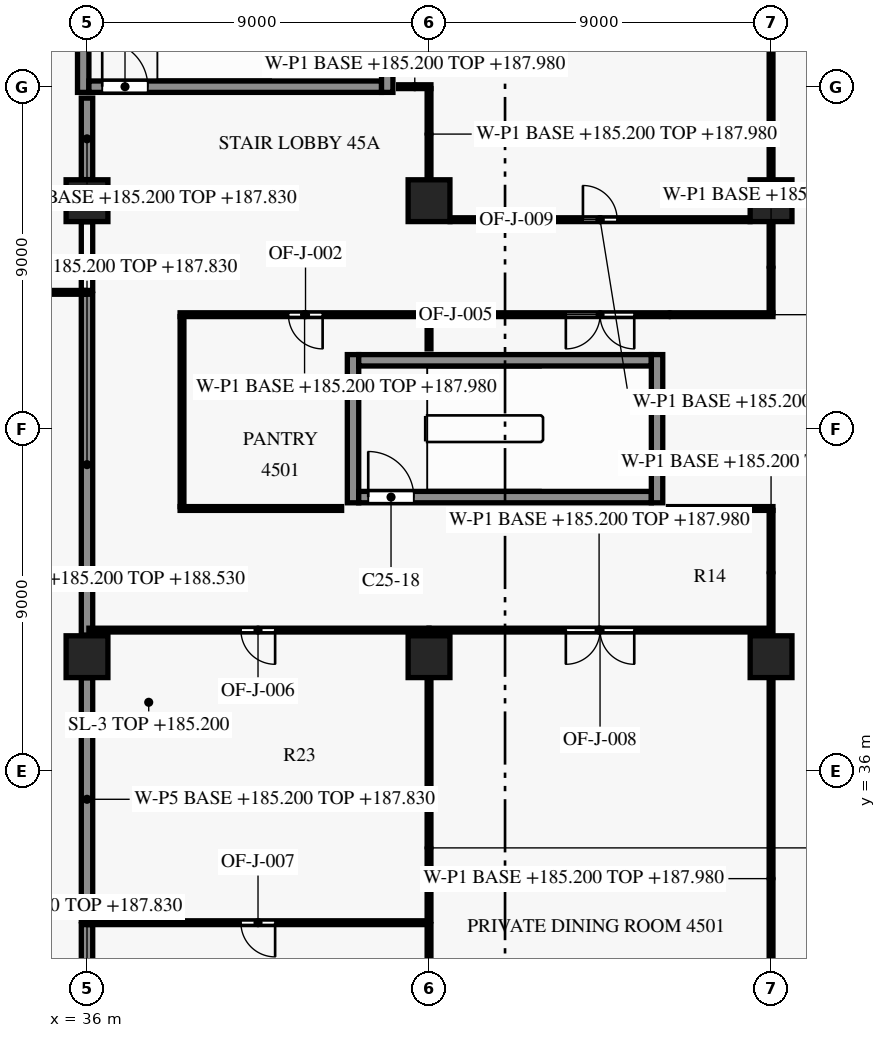
"""IFC4 building model, lengths in metres.
Left out: names, types, materials, properties, quantities, classifications, styles, units other than length and angle.
Written with IfcOpenShell. Run it as: python <this file> out.ifc"""

import sys

from ifc_helpers import new_model, si_unit, direction, frame, frame_2d, origin, origin_2d, place, context, subcontext, project, spatial, rectangle, extrude, element, fill, save


model = new_model("IFC4")
c1 = context("Model", 3, precision=1e-05, world=origin(), true_north=direction((0.0, 1.0)))
c2 = subcontext(c1, "Body", "Model", "MODEL_VIEW")
j1 = project(units=[si_unit("LENGTHUNIT", "METRE"), si_unit("PLANEANGLEUNIT", "RADIAN")], contexts=[c1])
p1 = place(None, origin())
s1 = spatial("IfcSite", under=j1, at=p1, CompositionType="ELEMENT")
p2 = place(p1, origin())
s2 = spatial("IfcBuilding", under=s1, at=p2, CompositionType="ELEMENT")
p3 = place(p2, frame((0.0, 0.0, 185.2)))
s3 = spatial("IfcBuildingStorey", under=s2, at=p3, CompositionType="ELEMENT", Elevation=185.2)
for number, where, z_axis, x_axis in (
    (1, (36.0, 39.0, 0.0), (0.0, 0.0, 1.0), (1.0, 0.0, 0.0)),
    (2, (36.0, 51.0, 0.0), (0.0, 0.0, 1.0), (1.0, 0.0, 0.0)),
    (3, (45.0, 39.0, 0.0), (0.0, 0.0, 1.0), (1.0, 0.0, 0.0)),
    (4, (45.0, 51.0, 0.0), (0.0, 0.0, 1.0), (1.0, 0.0, 0.0)),
    (5, (54.0, 39.0, 0.0), (0.0, 0.0, 1.0), (1.0, 0.0, 0.0)),
    (6, (54.0, 51.0, 0.0), (0.0, 0.0, 1.0), (1.0, 0.0, 0.0)),
):
    element("IfcColumn", number, at=place(p3, frame(where, z_axis=z_axis, x_axis=x_axis)), inside=s3, PredefinedType="COLUMN", context=c2, shape_type="SweptSolid", body=[
        extrude(rectangle(XDim=1.1, YDim=1.1, at=origin_2d()), origin(), (0.0, 0.0, 1.0), 3.8),
    ])
p4 = place(p3, frame((43.15, 43.2, 0.0), z_axis=(0.0, 0.0, 1.0), x_axis=(1.0, 0.0, 0.0)))
e7 = element("IfcWall", 7, at=p4, inside=s3, PredefinedType="SHEAR", context=c2, shape_type="SweptSolid", body=[
    extrude(rectangle(XDim=7.7, YDim=0.3, at=frame_2d((3.85, 0.0))), origin(), (0.0, 0.0, 1.0), 3.5),
])
p5 = place(p4, frame((0.25, 0.0, 0.0)))
e8 = element("IfcOpeningElement", 8, at=p5, cuts=e7, PredefinedType="OPENING", context=c2, shape_type="SweptSolid", body=[
    extrude(rectangle(XDim=1.2, YDim=2.2, at=frame_2d((0.6, 1.1))), frame((0.0, 0.16, 0.0), z_axis=(0.0, -1.0, 0.0), x_axis=(1.0, 0.0, 0.0)), (0.0, 0.0, 1.0), 0.32),
])
p6 = place(p3, frame((43.15, 46.8, 0.0), z_axis=(0.0, 0.0, 1.0), x_axis=(1.0, 0.0, 0.0)))
e9 = element("IfcWall", 9, at=p6, inside=s3, PredefinedType="SHEAR", context=c2, shape_type="SweptSolid", body=[
    extrude(rectangle(XDim=7.7, YDim=0.3, at=frame_2d((3.85, 0.0))), origin(), (0.0, 0.0, 1.0), 3.5),
])
p7 = place(p3, frame((36.05, 54.0, 0.0), z_axis=(0.0, 0.0, 1.0), x_axis=(1.0, 0.0, 0.0)))
e10 = element("IfcWall", 10, at=p7, inside=s3, PredefinedType="SHEAR", context=c2, shape_type="SweptSolid", body=[
    extrude(rectangle(XDim=7.7, YDim=0.3, at=frame_2d((3.85, 0.0))), origin(), (0.0, 0.0, 1.0), 3.5),
])
p8 = place(p7, frame((0.35, 0.0, 0.0)))
e11 = element("IfcOpeningElement", 11, at=p8, cuts=e10, PredefinedType="OPENING", context=c2, shape_type="SweptSolid", body=[
    extrude(rectangle(XDim=1.2, YDim=2.2, at=frame_2d((0.6, 1.1))), frame((0.0, 0.16, 0.0), z_axis=(0.0, -1.0, 0.0), x_axis=(1.0, 0.0, 0.0)), (0.0, 0.0, 1.0), 0.32),
])
for number, where, z_axis, x_axis in (
    (12, (35.9, 53.85, 0.0), (0.0, 0.0, 1.0), (0.0, 1.0, 0.0)),
    (13, (43.0, 43.05, 0.0), (0.0, 0.0, 1.0), (0.0, 1.0, 0.0)),
    (14, (43.9, 53.85, 0.0), (0.0, 0.0, 1.0), (0.0, 1.0, 0.0)),
    (15, (51.0, 43.05, 0.0), (0.0, 0.0, 1.0), (0.0, 1.0, 0.0)),
):
    element("IfcWall", number, at=place(p3, frame(where, z_axis=z_axis, x_axis=x_axis)), inside=s3, PredefinedType="SHEAR", context=c2, shape_type="SweptSolid", body=[
        extrude(rectangle(XDim=3.9, YDim=0.3, at=frame_2d((1.95, 0.0))), origin(), (0.0, 0.0, 1.0), 3.5),
    ])
p9 = place(p3, frame((54.0, 27.874, 0.0), z_axis=(0.0, 0.0, 1.0), x_axis=(0.0, 1.0, 0.0)))
e16 = element("IfcWall", 16, at=p9, inside=s3, PredefinedType="PARTITIONING", context=c2, shape_type="SweptSolid", body=[
    extrude(rectangle(XDim=10.571, YDim=0.1, at=frame_2d((5.285, 0.0))), origin(), (0.0, 0.0, 1.0), 2.78),
])
p10 = place(p3, frame((36.0, 27.874, 0.0), z_axis=(0.0, 0.0, 1.0), x_axis=(0.0, 1.0, 0.0)))
e17 = element("IfcWall", 17, at=p10, inside=s3, PredefinedType="PARTITIONING", context=c2, shape_type="SweptSolid", body=[
    extrude(rectangle(XDim=4.076, YDim=0.3, at=frame_2d((2.038, 0.0))), origin(), (0.0, 0.0, 1.0), 2.63),
])
p11 = place(p3, frame((45.0, 31.95, 0.0), z_axis=(0.0, 0.0, 1.0), x_axis=(0.0, -1.0, 0.0)))
e18 = element("IfcWall", 18, at=p11, inside=s3, PredefinedType="PARTITIONING", context=c2, shape_type="SweptSolid", body=[
    extrude(rectangle(XDim=4.976, YDim=0.1, at=frame_2d((2.488, 0.0))), origin(), (0.0, 0.0, 1.0), 2.78),
])
p12 = place(p3, frame((44.95, 32.0, 0.0), z_axis=(0.0, 0.0, 1.0), x_axis=(-1.0, 0.0, 0.0)))
e19 = element("IfcWall", 19, at=p12, inside=s3, PredefinedType="PARTITIONING", context=c2, shape_type="SweptSolid", body=[
    extrude(rectangle(XDim=8.9, YDim=0.1, at=frame_2d((4.45, 0.0))), origin(), (0.0, 0.0, 1.0), 2.63),
])
p13 = place(p12, frame((4.0, 0.0, 0.0)))
e20 = element("IfcOpeningElement", 20, at=p13, cuts=e19, PredefinedType="OPENING", context=c2, shape_type="SweptSolid", body=[
    extrude(rectangle(XDim=0.9, YDim=2.1, at=frame_2d((0.45, 1.05))), frame((0.0, 0.06, 0.0), z_axis=(0.0, -1.0, 0.0), x_axis=(1.0, 0.0, 0.0)), (0.0, 0.0, 1.0), 0.12),
])
p14 = place(p3, frame((36.0, 32.05, 0.0), z_axis=(0.0, 0.0, 1.0), x_axis=(0.0, 1.0, 0.0)))
e21 = element("IfcWall", 21, at=p14, inside=s3, PredefinedType="PARTITIONING", context=c2, shape_type="SweptSolid", body=[
    extrude(rectangle(XDim=6.395, YDim=0.3, at=frame_2d((3.198, 0.0))), origin(), (0.0, 0.0, 1.0), 2.63),
])
p15 = place(p3, frame((45.0, 38.445, 0.0), z_axis=(0.0, 0.0, 1.0), x_axis=(0.0, -1.0, 0.0)))
e22 = element("IfcWall", 22, at=p15, inside=s3, PredefinedType="PARTITIONING", context=c2, shape_type="SweptSolid", body=[
    extrude(rectangle(XDim=6.395, YDim=0.1, at=frame_2d((3.198, 0.0))), origin(), (0.0, 0.0, 1.0), 2.78),
])
p16 = place(p3, frame((45.0, 39.7, 0.0), z_axis=(0.0, 0.0, 1.0), x_axis=(-1.0, 0.0, 0.0)))
e23 = element("IfcWall", 23, at=p16, inside=s3, PredefinedType="PARTITIONING", context=c2, shape_type="SweptSolid", body=[
    extrude(rectangle(XDim=8.95, YDim=0.1, at=frame_2d((4.475, 0.0))), origin(), (0.0, 0.0, 1.0), 2.63),
])
p17 = place(p16, frame((4.05, 0.0, 0.0)))
e24 = element("IfcOpeningElement", 24, at=p17, cuts=e23, PredefinedType="OPENING", context=c2, shape_type="SweptSolid", body=[
    extrude(rectangle(XDim=0.9, YDim=2.1, at=frame_2d((0.45, 1.05))), frame((0.0, 0.06, 0.0), z_axis=(0.0, -1.0, 0.0), x_axis=(1.0, 0.0, 0.0)), (0.0, 0.0, 1.0), 0.12),
])
p18 = place(p3, frame((53.95, 39.7, 0.0), z_axis=(0.0, 0.0, 1.0), x_axis=(-1.0, 0.0, 0.0)))
e25 = element("IfcWall", 25, at=p18, inside=s3, PredefinedType="PARTITIONING", context=c2, shape_type="SweptSolid", body=[
    extrude(rectangle(XDim=8.95, YDim=0.1, at=frame_2d((4.475, 0.0))), origin(), (0.0, 0.0, 1.0), 2.78),
])
p19 = place(p18, frame((3.55, 0.0, 0.0)))
e26 = element("IfcOpeningElement", 26, at=p19, cuts=e25, PredefinedType="OPENING", context=c2, shape_type="SweptSolid", body=[
    extrude(rectangle(XDim=1.8, YDim=2.1, at=frame_2d((0.9, 1.05))), frame((0.0, 0.06, 0.0), z_axis=(0.0, -1.0, 0.0), x_axis=(1.0, 0.0, 0.0)), (0.0, 0.0, 1.0), 0.12),
])
p20 = place(p3, frame((36.0, 39.57, 0.0), z_axis=(0.0, 0.0, 1.0), x_axis=(0.0, 1.0, 0.0)))
e27 = element("IfcWall", 27, at=p20, inside=s3, PredefinedType="PARTITIONING", context=c2, shape_type="SweptSolid", body=[
    extrude(rectangle(XDim=8.968, YDim=0.3, at=frame_2d((4.484, 0.0))), origin(), (0.0, 0.0, 1.0), 2.63),
])
p21 = place(p3, frame((54.0, 42.85, 0.0), z_axis=(0.0, 0.0, 1.0), x_axis=(0.0, -1.0, 0.0)))
e28 = element("IfcWall", 28, at=p21, inside=s3, PredefinedType="PARTITIONING", context=c2, shape_type="SweptSolid", body=[
    extrude(rectangle(XDim=3.28, YDim=0.1, at=frame_2d((1.64, 0.0))), origin(), (0.0, 0.0, 1.0), 2.78),
])
p22 = place(p3, frame((38.45, 42.9, 0.0), z_axis=(0.0, 0.0, 1.0), x_axis=(1.0, 0.0, 0.0)))
e29 = element("IfcWall", 29, at=p22, inside=s3, PredefinedType="PARTITIONING", context=c2, shape_type="SweptSolid", body=[
    extrude(rectangle(XDim=4.25, YDim=0.1, at=frame_2d((2.125, 0.0))), origin(), (0.0, 0.0, 1.0), 2.63),
])
p23 = place(p3, frame((51.3, 42.9, 0.0), z_axis=(0.0, 0.0, 1.0), x_axis=(1.0, 0.0, 0.0)))
e30 = element("IfcWall", 30, at=p23, inside=s3, PredefinedType="PARTITIONING", context=c2, shape_type="SweptSolid", body=[
    extrude(rectangle(XDim=2.75, YDim=0.1, at=frame_2d((1.375, 0.0))), origin(), (0.0, 0.0, 1.0), 2.63),
])
p24 = place(p3, frame((38.5, 47.95, 0.0), z_axis=(0.0, 0.0, 1.0), x_axis=(0.0, -1.0, 0.0)))
e31 = element("IfcWall", 31, at=p24, inside=s3, PredefinedType="PARTITIONING", context=c2, shape_type="SweptSolid", body=[
    extrude(rectangle(XDim=5.0, YDim=0.1, at=frame_2d((2.5, 0.0))), origin(), (0.0, 0.0, 1.0), 2.63),
])
p25 = place(p3, frame((45.0, 47.95, 0.0), z_axis=(0.0, 0.0, 1.0), x_axis=(0.0, -1.0, 0.0)))
e32 = element("IfcWall", 32, at=p25, inside=s3, PredefinedType="PARTITIONING", context=c2, shape_type="SweptSolid", body=[
    extrude(rectangle(XDim=0.85, YDim=0.1, at=frame_2d((0.425, 0.0))), origin(), (0.0, 0.0, 1.0), 2.63),
])
p26 = place(p3, frame((45.0, 48.0, 0.0), z_axis=(0.0, 0.0, 1.0), x_axis=(-1.0, 0.0, 0.0)))
e33 = element("IfcWall", 33, at=p26, inside=s3, PredefinedType="PARTITIONING", context=c2, shape_type="SweptSolid", body=[
    extrude(rectangle(XDim=6.55, YDim=0.1, at=frame_2d((3.275, 0.0))), origin(), (0.0, 0.0, 1.0), 2.78),
])
p27 = place(p26, frame((2.8, 0.0, 0.0)))
e34 = element("IfcOpeningElement", 34, at=p27, cuts=e33, PredefinedType="OPENING", context=c2, shape_type="SweptSolid", body=[
    extrude(rectangle(XDim=0.9, YDim=2.1, at=frame_2d((0.45, 1.05))), frame((0.0, 0.06, 0.0), z_axis=(0.0, -1.0, 0.0), x_axis=(1.0, 0.0, 0.0)), (0.0, 0.0, 1.0), 0.12),
])
p28 = place(p3, frame((54.05, 48.0, 0.0), z_axis=(0.0, 0.0, 1.0), x_axis=(-1.0, 0.0, 0.0)))
e35 = element("IfcWall", 35, at=p28, inside=s3, PredefinedType="PARTITIONING", context=c2, shape_type="SweptSolid", body=[
    extrude(rectangle(XDim=9.05, YDim=0.1, at=frame_2d((4.525, 0.0))), origin(), (0.0, 0.0, 1.0), 2.78),
])
p29 = place(p28, frame((3.65, 0.0, 0.0)))
e36 = element("IfcOpeningElement", 36, at=p29, cuts=e35, PredefinedType="OPENING", context=c2, shape_type="SweptSolid", body=[
    extrude(rectangle(XDim=1.8, YDim=2.1, at=frame_2d((0.9, 1.05))), frame((0.0, 0.06, 0.0), z_axis=(0.0, -1.0, 0.0), x_axis=(1.0, 0.0, 0.0)), (0.0, 0.0, 1.0), 0.12),
])
p30 = place(p3, frame((31.05, 48.588, 0.0), z_axis=(0.0, 0.0, 1.0), x_axis=(1.0, 0.0, 0.0)))
e37 = element("IfcWall", 37, at=p30, inside=s3, PredefinedType="PARTITIONING", context=c2, shape_type="SweptSolid", body=[
    extrude(rectangle(XDim=4.9, YDim=0.1, at=frame_2d((2.45, 0.0))), origin(), (0.0, 0.0, 1.0), 2.63),
])
p31 = place(p3, frame((36.0, 48.638, 0.0), z_axis=(0.0, 0.0, 1.0), x_axis=(0.0, 1.0, 0.0)))
e38 = element("IfcWall", 38, at=p31, inside=s3, PredefinedType="PARTITIONING", context=c2, shape_type="SweptSolid", body=[
    extrude(rectangle(XDim=1.807, YDim=0.3, at=frame_2d((0.904, 0.0))), origin(), (0.0, 0.0, 1.0), 2.63),
])
p32 = place(p3, frame((54.0, 50.445, 0.0), z_axis=(0.0, 0.0, 1.0), x_axis=(0.0, -1.0, 0.0)))
e39 = element("IfcWall", 39, at=p32, inside=s3, PredefinedType="PARTITIONING", context=c2, shape_type="SweptSolid", body=[
    extrude(rectangle(XDim=2.395, YDim=0.1, at=frame_2d((1.198, 0.0))), origin(), (0.0, 0.0, 1.0), 2.78),
])
p33 = place(p3, frame((45.555, 50.5, 0.0), z_axis=(0.0, 0.0, 1.0), x_axis=(1.0, 0.0, 0.0)))
e40 = element("IfcWall", 40, at=p33, inside=s3, PredefinedType="PARTITIONING", context=c2, shape_type="SweptSolid", body=[
    extrude(rectangle(XDim=7.89, YDim=0.1, at=frame_2d((3.945, 0.0))), origin(), (0.0, 0.0, 1.0), 3.33),
])
p34 = place(p33, frame((3.495, 0.0, 0.0)))
e41 = element("IfcOpeningElement", 41, at=p34, cuts=e40, PredefinedType="OPENING", context=c2, shape_type="SweptSolid", body=[
    extrude(rectangle(XDim=0.9, YDim=2.1, at=frame_2d((0.45, 1.05))), frame((0.0, 0.06, 0.0), z_axis=(0.0, -1.0, 0.0), x_axis=(1.0, 0.0, 0.0)), (0.0, 0.0, 1.0), 0.12),
])
p35 = place(p3, frame((36.0, 51.555, 0.0), z_axis=(0.0, 0.0, 1.0), x_axis=(0.0, 1.0, 0.0)))
e42 = element("IfcWall", 42, at=p35, inside=s3, PredefinedType="PARTITIONING", context=c2, shape_type="SweptSolid", body=[
    extrude(rectangle(XDim=2.145, YDim=0.3, at=frame_2d((1.073, 0.0))), origin(), (0.0, 0.0, 1.0), 2.63),
])
p36 = place(p3, frame((54.0, 51.555, 0.0), z_axis=(0.0, 0.0, 1.0), x_axis=(0.0, 1.0, 0.0)))
e43 = element("IfcWall", 43, at=p36, inside=s3, PredefinedType="PARTITIONING", context=c2, shape_type="SweptSolid", body=[
    extrude(rectangle(XDim=10.571, YDim=0.1, at=frame_2d((5.285, 0.0))), origin(), (0.0, 0.0, 1.0), 2.78),
])
p37 = place(p3, frame((45.0, 53.95, 0.0), z_axis=(0.0, 0.0, 1.0), x_axis=(0.0, -1.0, 0.0)))
e44 = element("IfcWall", 44, at=p37, inside=s3, PredefinedType="PARTITIONING", context=c2, shape_type="SweptSolid", body=[
    extrude(rectangle(XDim=2.395, YDim=0.1, at=frame_2d((1.198, 0.0))), origin(), (0.0, 0.0, 1.0), 2.78),
])
p38 = place(p3, frame((44.2, 54.0, 0.0), z_axis=(0.0, 0.0, 1.0), x_axis=(1.0, 0.0, 0.0)))
e45 = element("IfcWall", 45, at=p38, inside=s3, PredefinedType="PARTITIONING", context=c2, shape_type="SweptSolid", body=[
    extrude(rectangle(XDim=0.85, YDim=0.1, at=frame_2d((0.425, 0.0))), origin(), (0.0, 0.0, 1.0), 2.78),
])
p39 = place(p8, origin())
e46 = element("IfcDoor", 46, at=p39, inside=s3, OperationType="SINGLE_SWING_LEFT", PredefinedType="DOOR", context=c2, shape_type="SweptSolid", body=[
    extrude(rectangle(XDim=1.2, YDim=2.2, at=frame_2d((0.6, 1.1))), frame((0.0, 0.025, 0.0), z_axis=(0.0, -1.0, 0.0), x_axis=(1.0, 0.0, 0.0)), (0.0, 0.0, 1.0), 0.05),
])
fill(e11, e46)
p40 = place(p5, origin())
e47 = element("IfcDoor", 47, at=p40, inside=s3, OperationType="SINGLE_SWING_RIGHT", PredefinedType="DOOR", context=c2, shape_type="SweptSolid", body=[
    extrude(rectangle(XDim=1.2, YDim=2.2, at=frame_2d((0.6, 1.1))), frame((0.0, 0.025, 0.0), z_axis=(0.0, -1.0, 0.0), x_axis=(1.0, 0.0, 0.0)), (0.0, 0.0, 1.0), 0.05),
])
fill(e8, e47)
p41 = place(p27, origin())
e48 = element("IfcDoor", 48, at=p41, inside=s3, OperationType="SINGLE_SWING_RIGHT", PredefinedType="DOOR", context=c2, shape_type="SweptSolid", body=[
    extrude(rectangle(XDim=0.9, YDim=2.1, at=frame_2d((0.45, 1.05))), frame((0.0, 0.025, 0.0), z_axis=(0.0, -1.0, 0.0), x_axis=(1.0, 0.0, 0.0)), (0.0, 0.0, 1.0), 0.05),
])
fill(e34, e48)
p42 = place(p29, origin())
e49 = element("IfcDoor", 49, at=p42, inside=s3, OperationType="DOUBLE_DOOR_SINGLE_SWING", PredefinedType="DOOR", context=c2, shape_type="SweptSolid", body=[
    extrude(rectangle(XDim=1.8, YDim=2.1, at=frame_2d((0.9, 1.05))), frame((0.0, 0.025, 0.0), z_axis=(0.0, -1.0, 0.0), x_axis=(1.0, 0.0, 0.0)), (0.0, 0.0, 1.0), 0.05),
])
fill(e36, e49)
p43 = place(p17, origin())
e50 = element("IfcDoor", 50, at=p43, inside=s3, OperationType="SINGLE_SWING_LEFT", PredefinedType="DOOR", context=c2, shape_type="SweptSolid", body=[
    extrude(rectangle(XDim=0.9, YDim=2.1, at=frame_2d((0.45, 1.05))), frame((0.0, 0.025, 0.0), z_axis=(0.0, -1.0, 0.0), x_axis=(1.0, 0.0, 0.0)), (0.0, 0.0, 1.0), 0.05),
])
fill(e24, e50)
p44 = place(p13, origin())
e51 = element("IfcDoor", 51, at=p44, inside=s3, OperationType="SINGLE_SWING_LEFT", PredefinedType="DOOR", context=c2, shape_type="SweptSolid", body=[
    extrude(rectangle(XDim=0.9, YDim=2.1, at=frame_2d((0.45, 1.05))), frame((0.0, 0.025, 0.0), z_axis=(0.0, -1.0, 0.0), x_axis=(1.0, 0.0, 0.0)), (0.0, 0.0, 1.0), 0.05),
])
fill(e20, e51)
p45 = place(p19, origin())
e52 = element("IfcDoor", 52, at=p45, inside=s3, OperationType="DOUBLE_DOOR_SINGLE_SWING", PredefinedType="DOOR", context=c2, shape_type="SweptSolid", body=[
    extrude(rectangle(XDim=1.8, YDim=2.1, at=frame_2d((0.9, 1.05))), frame((0.0, 0.025, 0.0), z_axis=(0.0, -1.0, 0.0), x_axis=(1.0, 0.0, 0.0)), (0.0, 0.0, 1.0), 0.05),
])
fill(e26, e52)
p46 = place(p34, origin())
e53 = element("IfcDoor", 53, at=p46, inside=s3, OperationType="SINGLE_SWING_LEFT", PredefinedType="DOOR", context=c2, shape_type="SweptSolid", body=[
    extrude(rectangle(XDim=0.9, YDim=2.1, at=frame_2d((0.45, 1.05))), frame((0.0, 0.025, 0.0), z_axis=(0.0, -1.0, 0.0), x_axis=(1.0, 0.0, 0.0)), (0.0, 0.0, 1.0), 0.05),
])
fill(e41, e53)
save(model, sys.argv[1])
